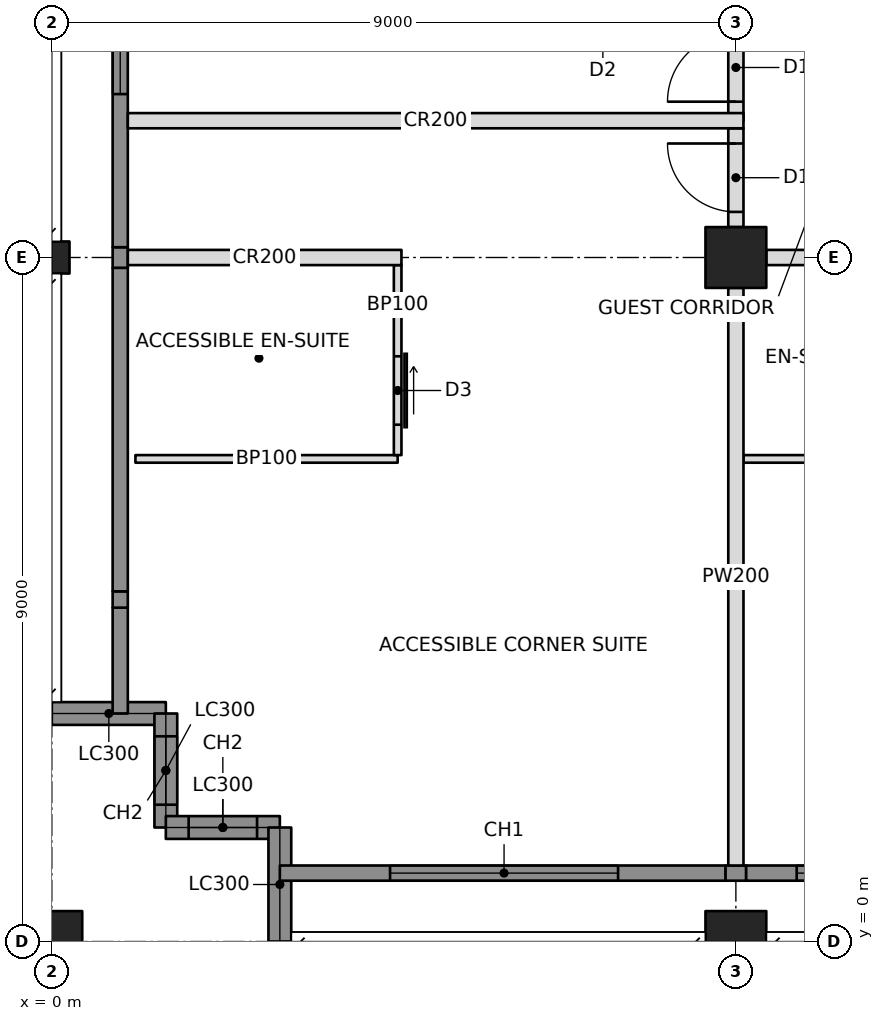
"""IFC4 building model, lengths in metres.
Left out: names, types, materials, properties, quantities, classifications, styles, units other than length and angle.
Written with IfcOpenShell. Run it as: python <this file> out.ifc"""

import sys

from ifc_helpers import new_model, si_unit, direction, frame, frame_2d, origin, origin_with_axes, origin_2d, place, context, subcontext, project, spatial, rectangle, hollow_rectangle, i_section, extrude, element, fill, save


model = new_model("IFC4")
c1 = context("Model", 3, precision=1e-05, world=origin(), true_north=direction((0.0, 1.0)))
c2 = subcontext(c1, "Body", "Model", "MODEL_VIEW")
j1 = project(units=[si_unit("LENGTHUNIT", "METRE"), si_unit("PLANEANGLEUNIT", "RADIAN")], contexts=[c1])
p1 = place(None, origin())
s1 = spatial("IfcSite", under=j1, at=p1, CompositionType="ELEMENT")
p2 = place(p1, origin())
s2 = spatial("IfcBuilding", under=s1, at=p2, CompositionType="ELEMENT")
p3 = place(p2, frame((0.0, 0.0, 237.4)))
s3 = spatial("IfcBuildingStorey", under=s2, at=p3, CompositionType="ELEMENT", Elevation=237.4)
p4 = place(p3, origin_with_axes())
e1 = element("IfcColumn", 1, at=p4, inside=s3, PredefinedType="COLUMN", context=c2, shape_type="SweptSolid", body=[
    extrude(hollow_rectangle(XDim=0.8, YDim=0.8, WallThickness=0.05, at=origin_2d()), origin(), (0.0, 0.0, 1.0), 3.6),
])
p5 = place(p3, frame((0.0, 9.0, 0.0), z_axis=(0.0, 0.0, 1.0), x_axis=(0.0, 1.0, 0.0)))
e2 = element("IfcColumn", 2, at=p5, inside=s3, PredefinedType="COLUMN", context=c2, shape_type="SweptSolid", body=[
    extrude(i_section(OverallWidth=0.422, OverallDepth=0.465, WebThickness=0.045, FlangeThickness=0.073, at=origin_2d()), origin(), (0.0, 0.0, 1.0), 3.6),
])
p6 = place(p3, frame((9.0, 0.0, 0.0), z_axis=(0.0, 0.0, 1.0), x_axis=(1.0, 0.0, 0.0)))
e3 = element("IfcColumn", 3, at=p6, inside=s3, PredefinedType="COLUMN", context=c2, shape_type="SweptSolid", body=[
    extrude(hollow_rectangle(XDim=0.8, YDim=0.8, WallThickness=0.05, at=origin_2d()), origin(), (0.0, 0.0, 1.0), 3.6),
])
p7 = place(p3, frame((9.0, 9.0, 0.0), z_axis=(0.0, 0.0, 1.0), x_axis=(1.0, 0.0, 0.0)))
e4 = element("IfcColumn", 4, at=p7, inside=s3, PredefinedType="COLUMN", context=c2, shape_type="SweptSolid", body=[
    extrude(hollow_rectangle(XDim=0.8, YDim=0.8, WallThickness=0.04, at=origin_2d()), origin(), (0.0, 0.0, 1.0), 3.6),
])
p8 = place(p3, frame((0.0, 3.0, 0.0), z_axis=(0.0, 0.0, 1.0), x_axis=(1.0, 0.0, 0.0)))
e5 = element("IfcWall", 5, at=p8, inside=s3, PredefinedType="SOLIDWALL", context=c2, shape_type="SweptSolid", body=[
    extrude(rectangle(XDim=1.5, YDim=0.3, at=frame_2d((0.75, 0.0))), origin(), (0.0, 0.0, 1.0), 2.62),
])
p9 = place(p3, frame((1.5, 3.0, 0.0), z_axis=(0.0, 0.0, 1.0), x_axis=(0.0, -1.0, 0.0)))
e6 = element("IfcWall", 6, at=p9, inside=s3, PredefinedType="SOLIDWALL", context=c2, shape_type="SweptSolid", body=[
    extrude(rectangle(XDim=1.5, YDim=0.3, at=frame_2d((0.75, 0.0))), origin(), (0.0, 0.0, 1.0), 3.4),
])
p10 = place(p9, frame((0.3, 0.0, 0.6)))
e7 = element("IfcOpeningElement", 7, at=p10, cuts=e6, PredefinedType="OPENING", context=c2, shape_type="SweptSolid", body=[
    extrude(rectangle(XDim=0.9, YDim=2.2, at=frame_2d((0.45, 1.1))), frame((0.0, 0.16, 0.0), z_axis=(0.0, -1.0, 0.0), x_axis=(1.0, 0.0, 0.0)), (0.0, 0.0, 1.0), 0.32),
])
p11 = place(p3, frame((1.5, 1.5, 0.0), z_axis=(0.0, 0.0, 1.0), x_axis=(1.0, 0.0, 0.0)))
e8 = element("IfcWall", 8, at=p11, inside=s3, PredefinedType="SOLIDWALL", context=c2, shape_type="SweptSolid", body=[
    extrude(rectangle(XDim=1.5, YDim=0.3, at=frame_2d((0.75, 0.0))), origin(), (0.0, 0.0, 1.0), 3.4),
])
p12 = place(p11, frame((0.3, 0.0, 0.6)))
e9 = element("IfcOpeningElement", 9, at=p12, cuts=e8, PredefinedType="OPENING", context=c2, shape_type="SweptSolid", body=[
    extrude(rectangle(XDim=0.9, YDim=2.2, at=frame_2d((0.45, 1.1))), frame((0.0, 0.16, 0.0), z_axis=(0.0, -1.0, 0.0), x_axis=(1.0, 0.0, 0.0)), (0.0, 0.0, 1.0), 0.32),
])
p13 = place(p3, frame((3.0, 1.5, 0.0), z_axis=(0.0, 0.0, 1.0), x_axis=(0.0, -1.0, 0.0)))
e10 = element("IfcWall", 10, at=p13, inside=s3, PredefinedType="SOLIDWALL", context=c2, shape_type="SweptSolid", body=[
    extrude(rectangle(XDim=1.5, YDim=0.3, at=frame_2d((0.75, 0.0))), origin(), (0.0, 0.0, 1.0), 2.62),
])
p14 = place(p3, frame((3.0, 0.9, 0.0), z_axis=(0.0, 0.0, 1.0), x_axis=(1.0, 0.0, 0.0)))
e11 = element("IfcWall", 11, at=p14, inside=s3, PredefinedType="SOLIDWALL", context=c2, shape_type="SweptSolid", body=[
    extrude(rectangle(XDim=5.865, YDim=0.2, at=frame_2d((2.932, 0.0))), origin(), (0.0, 0.0, 1.0), 3.4),
])
p15 = place(p14, frame((1.45, 0.0, 0.6)))
e12 = element("IfcOpeningElement", 12, at=p15, cuts=e11, PredefinedType="OPENING", context=c2, shape_type="SweptSolid", body=[
    extrude(rectangle(XDim=3.0, YDim=2.2, at=frame_2d((1.5, 1.1))), frame((0.0, 0.11, 0.0), z_axis=(0.0, -1.0, 0.0), x_axis=(1.0, 0.0, 0.0)), (0.0, 0.0, 1.0), 0.22),
])
p16 = place(p3, frame((0.9, 3.0, 0.0), z_axis=(0.0, 0.0, 1.0), x_axis=(0.0, 1.0, 0.0)))
e13 = element("IfcWall", 13, at=p16, inside=s3, PredefinedType="SOLIDWALL", context=c2, shape_type="SweptSolid", body=[
    extrude(rectangle(XDim=1.393, YDim=0.2, at=frame_2d((0.696, 0.0))), origin(), (0.0, 0.0, 1.0), 3.4),
])
p17 = place(p3, frame((1.0, 9.0, 0.0), z_axis=(0.0, 0.0, 1.0), x_axis=(1.0, 0.0, 0.0)))
e14 = element("IfcWall", 14, at=p17, inside=s3, PredefinedType="PARTITIONING", context=c2, shape_type="SweptSolid", body=[
    extrude(rectangle(XDim=3.6, YDim=0.2, at=frame_2d((1.8, 0.0))), origin(), (0.0, 0.0, 1.0), 2.638),
])
p18 = place(p3, frame((9.4, 9.0, 0.0), z_axis=(0.0, 0.0, 1.0), x_axis=(1.0, 0.0, 0.0)))
e15 = element("IfcWall", 15, at=p18, inside=s3, PredefinedType="PARTITIONING", context=c2, shape_type="SweptSolid", body=[
    extrude(rectangle(XDim=8.2, YDim=0.2, at=frame_2d((4.1, 0.0))), origin(), (0.0, 0.0, 1.0), 2.605),
])
p19 = place(p18, frame((2.95, 0.0, 0.0)))
e16 = element("IfcOpeningElement", 16, at=p19, cuts=e15, PredefinedType="OPENING", context=c2, shape_type="SweptSolid", body=[
    extrude(rectangle(XDim=0.9, YDim=2.1, at=frame_2d((0.45, 1.05))), frame((0.0, 0.11, 0.0), z_axis=(0.0, -1.0, 0.0), x_axis=(1.0, 0.0, 0.0)), (0.0, 0.0, 1.0), 0.22),
])
p20 = place(p18, frame((4.35, 0.0, 0.0)))
e17 = element("IfcOpeningElement", 17, at=p20, cuts=e15, PredefinedType="OPENING", context=c2, shape_type="SweptSolid", body=[
    extrude(rectangle(XDim=0.9, YDim=2.1, at=frame_2d((0.45, 1.05))), frame((0.0, 0.11, 0.0), z_axis=(0.0, -1.0, 0.0), x_axis=(1.0, 0.0, 0.0)), (0.0, 0.0, 1.0), 0.22),
])
p21 = place(p3, frame((9.0, 10.8, 0.0), z_axis=(0.0, 0.0, 1.0), x_axis=(0.0, 1.0, 0.0)))
e18 = element("IfcWall", 18, at=p21, inside=s3, PredefinedType="PARTITIONING", context=c2, shape_type="SweptSolid", body=[
    extrude(rectangle(XDim=6.8, YDim=0.2, at=frame_2d((3.4, 0.0))), origin(), (0.0, 0.0, 1.0), 2.605),
])
p22 = place(p21, frame((0.25, 0.0, 0.0)))
e19 = element("IfcOpeningElement", 19, at=p22, cuts=e18, PredefinedType="OPENING", context=c2, shape_type="SweptSolid", body=[
    extrude(rectangle(XDim=0.9, YDim=2.1, at=frame_2d((0.45, 1.05))), frame((0.0, 0.11, 0.0), z_axis=(0.0, -1.0, 0.0), x_axis=(1.0, 0.0, 0.0)), (0.0, 0.0, 1.0), 0.22),
])
p23 = place(p21, frame((3.85, 0.0, 0.0)))
e20 = element("IfcOpeningElement", 20, at=p23, cuts=e18, PredefinedType="OPENING", context=c2, shape_type="SweptSolid", body=[
    extrude(rectangle(XDim=0.9, YDim=2.1, at=frame_2d((0.45, 1.05))), frame((0.0, 0.11, 0.0), z_axis=(0.0, -1.0, 0.0), x_axis=(1.0, 0.0, 0.0)), (0.0, 0.0, 1.0), 0.22),
])
p24 = place(p3, frame((1.0, 10.8, 0.0), z_axis=(0.0, 0.0, 1.0), x_axis=(1.0, 0.0, 0.0)))
e21 = element("IfcWall", 21, at=p24, inside=s3, PredefinedType="PARTITIONING", context=c2, shape_type="SweptSolid", body=[
    extrude(rectangle(XDim=8.1, YDim=0.2, at=frame_2d((4.05, 0.0))), origin(), (0.0, 0.0, 1.0), 2.604),
])
p25 = place(p3, frame((9.0, 8.6, 0.0), z_axis=(0.0, 0.0, 1.0), x_axis=(0.0, -1.0, 0.0)))
e22 = element("IfcWall", 22, at=p25, inside=s3, PredefinedType="PARTITIONING", context=c2, shape_type="SweptSolid", body=[
    extrude(rectangle(XDim=7.6, YDim=0.2, at=frame_2d((3.8, 0.0))), origin(), (0.0, 0.0, 1.0), 2.638),
])
p26 = place(p3, frame((1.1, 6.35, 0.0), z_axis=(0.0, 0.0, 1.0), x_axis=(1.0, 0.0, 0.0)))
e23 = element("IfcWall", 23, at=p26, inside=s3, PredefinedType="PARTITIONING", context=c2, shape_type="SweptSolid", body=[
    extrude(rectangle(XDim=3.45, YDim=0.1, at=frame_2d((1.725, 0.0))), origin(), (0.0, 0.0, 1.0), 3.4),
])
p27 = place(p3, frame((4.55, 8.9, 0.0), z_axis=(0.0, 0.0, 1.0), x_axis=(0.0, -1.0, 0.0)))
e24 = element("IfcWall", 24, at=p27, inside=s3, PredefinedType="PARTITIONING", context=c2, shape_type="SweptSolid", body=[
    extrude(rectangle(XDim=2.5, YDim=0.1, at=frame_2d((1.25, 0.0))), origin(), (0.0, 0.0, 1.0), 2.638),
])
p28 = place(p27, frame((1.2, 0.0, 0.0)))
e25 = element("IfcOpeningElement", 25, at=p28, cuts=e24, PredefinedType="OPENING", context=c2, shape_type="SweptSolid", body=[
    extrude(rectangle(XDim=0.9, YDim=2.1, at=frame_2d((0.45, 1.05))), frame((0.0, 0.06, 0.0), z_axis=(0.0, -1.0, 0.0), x_axis=(1.0, 0.0, 0.0)), (0.0, 0.0, 1.0), 0.12),
])
p29 = place(p3, frame((9.1, 6.35, 0.0), z_axis=(0.0, 0.0, 1.0), x_axis=(1.0, 0.0, 0.0)))
e26 = element("IfcWall", 26, at=p29, inside=s3, PredefinedType="PARTITIONING", context=c2, shape_type="SweptSolid", body=[
    extrude(rectangle(XDim=2.95, YDim=0.1, at=frame_2d((1.475, 0.0))), origin(), (0.0, 0.0, 1.0), 2.638),
])
p30 = place(p3, frame((9.0, 9.4, 0.0), z_axis=(0.0, 0.0, 1.0), x_axis=(0.0, 1.0, 0.0)))
e27 = element("IfcWall", 27, at=p30, inside=s3, PredefinedType="PARTITIONING", context=c2, shape_type="SweptSolid", body=[
    extrude(rectangle(XDim=1.3, YDim=0.2, at=frame_2d((0.65, 0.0))), origin(), (0.0, 0.0, 1.0), 2.605),
])
p31 = place(p30, frame((0.2, 0.0, 0.0)))
e28 = element("IfcOpeningElement", 28, at=p31, cuts=e27, PredefinedType="OPENING", context=c2, shape_type="SweptSolid", body=[
    extrude(rectangle(XDim=0.9, YDim=2.1, at=frame_2d((0.45, 1.05))), frame((0.0, 0.11, 0.0), z_axis=(0.0, -1.0, 0.0), x_axis=(1.0, 0.0, 0.0)), (0.0, 0.0, 1.0), 0.22),
])
p32 = place(p3, frame((8.865, 0.9, 0.0), z_axis=(0.0, 0.0, 1.0), x_axis=(1.0, 0.0, 0.0)))
e29 = element("IfcWall", 29, at=p32, inside=s3, PredefinedType="SOLIDWALL", context=c2, shape_type="SweptSolid", body=[
    extrude(rectangle(XDim=0.271, YDim=0.2, at=frame_2d((0.135, 0.0))), origin(), (0.0, 0.0, 1.0), 2.638),
])
p33 = place(p3, frame((9.135, 0.9, 0.0), z_axis=(0.0, 0.0, 1.0), x_axis=(1.0, 0.0, 0.0)))
e30 = element("IfcWall", 30, at=p33, inside=s3, PredefinedType="SOLIDWALL", context=c2, shape_type="SweptSolid", body=[
    extrude(rectangle(XDim=8.671, YDim=0.2, at=frame_2d((4.335, 0.0))), origin(), (0.0, 0.0, 1.0), 3.4),
])
p34 = place(p33, frame((0.665, 0.0, 0.6)))
e31 = element("IfcOpeningElement", 31, at=p34, cuts=e30, PredefinedType="OPENING", context=c2, shape_type="SweptSolid", body=[
    extrude(rectangle(XDim=3.0, YDim=2.2, at=frame_2d((1.5, 1.1))), frame((0.0, 0.11, 0.0), z_axis=(0.0, -1.0, 0.0), x_axis=(1.0, 0.0, 0.0)), (0.0, 0.0, 1.0), 0.22),
])
p35 = place(p33, frame((5.065, 0.0, 0.6)))
e32 = element("IfcOpeningElement", 32, at=p35, cuts=e30, PredefinedType="OPENING", context=c2, shape_type="SweptSolid", body=[
    extrude(rectangle(XDim=3.0, YDim=2.2, at=frame_2d((1.5, 1.1))), frame((0.0, 0.11, 0.0), z_axis=(0.0, -1.0, 0.0), x_axis=(1.0, 0.0, 0.0)), (0.0, 0.0, 1.0), 0.22),
])
p36 = place(p3, frame((0.9, 4.393, 0.0), z_axis=(0.0, 0.0, 1.0), x_axis=(0.0, 1.0, 0.0)))
e33 = element("IfcWall", 33, at=p36, inside=s3, PredefinedType="SOLIDWALL", context=c2, shape_type="SweptSolid", body=[
    extrude(rectangle(XDim=0.215, YDim=0.2, at=frame_2d((0.107, 0.0))), origin(), (0.0, 0.0, 1.0), 2.861),
])
p37 = place(p3, frame((0.9, 4.607, 0.0), z_axis=(0.0, 0.0, 1.0), x_axis=(0.0, 1.0, 0.0)))
e34 = element("IfcWall", 34, at=p37, inside=s3, PredefinedType="SOLIDWALL", context=c2, shape_type="SweptSolid", body=[
    extrude(rectangle(XDim=4.257, YDim=0.2, at=frame_2d((2.129, 0.0))), origin(), (0.0, 0.0, 1.0), 3.4),
])
p38 = place(p3, frame((0.9, 8.865, 0.0), z_axis=(0.0, 0.0, 1.0), x_axis=(0.0, 1.0, 0.0)))
e35 = element("IfcWall", 35, at=p38, inside=s3, PredefinedType="SOLIDWALL", context=c2, shape_type="SweptSolid", body=[
    extrude(rectangle(XDim=0.271, YDim=0.2, at=frame_2d((0.135, 0.0))), origin(), (0.0, 0.0, 1.0), 2.638),
])
p39 = place(p3, frame((0.9, 9.135, 0.0), z_axis=(0.0, 0.0, 1.0), x_axis=(0.0, 1.0, 0.0)))
e36 = element("IfcWall", 36, at=p39, inside=s3, PredefinedType="SOLIDWALL", context=c2, shape_type="SweptSolid", body=[
    extrude(rectangle(XDim=8.671, YDim=0.2, at=frame_2d((4.335, 0.0))), origin(), (0.0, 0.0, 1.0), 3.4),
])
p40 = place(p39, frame((2.015, 0.0, 0.6)))
e37 = element("IfcOpeningElement", 37, at=p40, cuts=e36, PredefinedType="OPENING", context=c2, shape_type="SweptSolid", body=[
    extrude(rectangle(XDim=3.0, YDim=2.2, at=frame_2d((1.5, 1.1))), frame((0.0, 0.11, 0.0), z_axis=(0.0, -1.0, 0.0), x_axis=(1.0, 0.0, 0.0)), (0.0, 0.0, 1.0), 0.22),
])
p41 = place(p39, frame((5.515, 0.0, 0.6)))
e38 = element("IfcOpeningElement", 38, at=p41, cuts=e36, PredefinedType="OPENING", context=c2, shape_type="SweptSolid", body=[
    extrude(rectangle(XDim=3.0, YDim=2.2, at=frame_2d((1.5, 1.1))), frame((0.0, 0.11, 0.0), z_axis=(0.0, -1.0, 0.0), x_axis=(1.0, 0.0, 0.0)), (0.0, 0.0, 1.0), 0.22),
])
p42 = place(p10, origin())
e39 = element("IfcWindow", 39, at=p42, inside=s3, PartitioningType="SINGLE_PANEL", PredefinedType="WINDOW", context=c2, shape_type="SweptSolid", body=[
    extrude(rectangle(XDim=0.9, YDim=2.2, at=frame_2d((0.45, 1.1))), frame((0.0, 0.03, 0.0), z_axis=(0.0, -1.0, 0.0), x_axis=(1.0, 0.0, 0.0)), (0.0, 0.0, 1.0), 0.06),
])
fill(e7, e39)
p43 = place(p12, origin())
e40 = element("IfcWindow", 40, at=p43, inside=s3, PartitioningType="SINGLE_PANEL", PredefinedType="WINDOW", context=c2, shape_type="SweptSolid", body=[
    extrude(rectangle(XDim=0.9, YDim=2.2, at=frame_2d((0.45, 1.1))), frame((0.0, 0.03, 0.0), z_axis=(0.0, -1.0, 0.0), x_axis=(1.0, 0.0, 0.0)), (0.0, 0.0, 1.0), 0.06),
])
fill(e9, e40)
p44 = place(p15, origin())
e41 = element("IfcWindow", 41, at=p44, inside=s3, PartitioningType="TRIPLE_PANEL_VERTICAL", PredefinedType="WINDOW", context=c2, shape_type="SweptSolid", body=[
    extrude(rectangle(XDim=3.0, YDim=2.2, at=frame_2d((1.5, 1.1))), frame((0.0, 0.03, 0.0), z_axis=(0.0, -1.0, 0.0), x_axis=(1.0, 0.0, 0.0)), (0.0, 0.0, 1.0), 0.06),
])
fill(e12, e41)
p45 = place(p34, origin())
e42 = element("IfcWindow", 42, at=p45, inside=s3, PartitioningType="TRIPLE_PANEL_VERTICAL", PredefinedType="WINDOW", context=c2, shape_type="SweptSolid", body=[
    extrude(rectangle(XDim=3.0, YDim=2.2, at=frame_2d((1.5, 1.1))), frame((0.0, 0.03, 0.0), z_axis=(0.0, -1.0, 0.0), x_axis=(1.0, 0.0, 0.0)), (0.0, 0.0, 1.0), 0.06),
])
fill(e31, e42)
p46 = place(p40, origin())
e43 = element("IfcWindow", 43, at=p46, inside=s3, PartitioningType="TRIPLE_PANEL_VERTICAL", PredefinedType="WINDOW", context=c2, shape_type="SweptSolid", body=[
    extrude(rectangle(XDim=3.0, YDim=2.2, at=frame_2d((1.5, 1.1))), frame((0.0, 0.03, 0.0), z_axis=(0.0, -1.0, 0.0), x_axis=(1.0, 0.0, 0.0)), (0.0, 0.0, 1.0), 0.06),
])
fill(e37, e43)
p47 = place(p28, origin())
e44 = element("IfcDoor", 44, at=p47, inside=s3, OperationType="SLIDING_TO_LEFT", PredefinedType="DOOR", context=c2, shape_type="SweptSolid", body=[
    extrude(rectangle(XDim=0.9, YDim=2.1, at=frame_2d((0.45, 1.05))), frame((0.0, 0.025, 0.0), z_axis=(0.0, -1.0, 0.0), x_axis=(1.0, 0.0, 0.0)), (0.0, 0.0, 1.0), 0.05),
])
fill(e25, e44)
p48 = place(p22, origin())
e45 = element("IfcDoor", 45, at=p48, inside=s3, OperationType="SINGLE_SWING_LEFT", PredefinedType="DOOR", context=c2, shape_type="SweptSolid", body=[
    extrude(rectangle(XDim=0.9, YDim=2.1, at=frame_2d((0.45, 1.05))), frame((0.0, 0.025, 0.0), z_axis=(0.0, -1.0, 0.0), x_axis=(1.0, 0.0, 0.0)), (0.0, 0.0, 1.0), 0.05),
])
fill(e19, e45)
p49 = place(p31, origin())
e46 = element("IfcDoor", 46, at=p49, inside=s3, OperationType="SINGLE_SWING_RIGHT", PredefinedType="DOOR", context=c2, shape_type="SweptSolid", body=[
    extrude(rectangle(XDim=0.9, YDim=2.1, at=frame_2d((0.45, 1.05))), frame((0.0, 0.025, 0.0), z_axis=(0.0, -1.0, 0.0), x_axis=(1.0, 0.0, 0.0)), (0.0, 0.0, 1.0), 0.05),
])
fill(e28, e46)
save(model, sys.argv[1])
